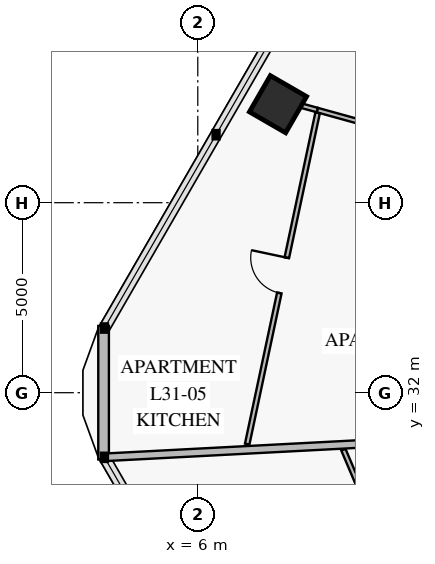
"""IFC4 building model, lengths in metres.
Left out: names, types, materials, properties, quantities, classifications, styles, units other than length and angle.
Written with IfcOpenShell. Run it as: python <this file> out.ifc"""

import sys

from ifc_helpers import new_model, si_unit, direction, frame, frame_2d, origin, origin_2d, place, context, subcontext, project, spatial, rectangle, extrude, element, fill, save


model = new_model("IFC4")
c1 = context("Model", 3, precision=1e-05, world=origin(), true_north=direction((0.0, 1.0)))
c2 = subcontext(c1, "Body", "Model", "MODEL_VIEW")
j1 = project(units=[si_unit("LENGTHUNIT", "METRE"), si_unit("PLANEANGLEUNIT", "RADIAN")], contexts=[c1])
p1 = place(None, origin())
s1 = spatial("IfcSite", under=j1, at=p1, CompositionType="ELEMENT")
p2 = place(p1, origin())
s2 = spatial("IfcBuilding", under=s1, at=p2, CompositionType="ELEMENT")
p3 = place(p2, frame((0.0, 0.0, 126.6)))
s3 = spatial("IfcBuildingStorey", under=s2, at=p3, CompositionType="ELEMENT", Elevation=126.6)
p4 = place(p3, frame((8.111, 39.592, 0.0), z_axis=(0.0, 0.0, 1.0), x_axis=(-0.5, -0.866025403784, 0.0)))
e1 = element("IfcColumn", 1, at=p4, inside=s3, PredefinedType="COLUMN", context=c2, shape_type="SweptSolid", body=[
    extrude(rectangle(XDim=1.1, YDim=1.1, at=origin_2d()), origin(), (0.0, 0.0, 1.0), 3.55),
])
p5 = place(p3, frame((3.521, 30.242, 0.0), z_axis=(0.0, 0.0, 1.0), x_axis=(0.0, 1.0, 0.0)))
e2 = element("IfcWall", 2, at=p5, inside=s3, PredefinedType="SOLIDWALL", context=c2, shape_type="SweptSolid", body=[
    extrude(rectangle(XDim=3.515, YDim=0.28, at=frame_2d((1.758, 0.0))), origin(), (0.0, 0.0, 1.0), 3.55),
])
p6 = place(p3, frame((12.165, 38.601, 0.0), z_axis=(0.0, 0.0, 1.0), x_axis=(-0.963725092481, 0.266896882939, 0.0)))
e3 = element("IfcWall", 3, at=p6, inside=s3, PredefinedType="PARTITIONING", context=c2, shape_type="SweptSolid", body=[
    extrude(rectangle(XDim=3.136, YDim=0.12, at=frame_2d((1.568, 0.0))), origin(), (0.0, 0.0, 1.0), 2.85),
])
p7 = place(p3, frame((9.153, 39.365, 0.0), z_axis=(0.0, 0.0, 1.0), x_axis=(-0.207912484837, -0.978147431959, 0.0)))
e4 = element("IfcWall", 4, at=p7, inside=s3, PredefinedType="PARTITIONING", context=c2, shape_type="SweptSolid", body=[
    extrude(rectangle(XDim=8.913, YDim=0.12, at=frame_2d((4.456, 0.0))), origin(), (0.0, 0.0, 1.0), 2.8),
])
p8 = place(p7, frame((3.897, 0.0, 0.0)))
e5 = element("IfcOpeningElement", 5, at=p8, cuts=e4, PredefinedType="OPENING", context=c2, shape_type="SweptSolid", body=[
    extrude(rectangle(XDim=0.95, YDim=2.1, at=frame_2d((0.475, 1.05))), frame((0.0, 0.072, 0.0), z_axis=(0.0, -1.0, 0.0), x_axis=(1.0, 0.0, 0.0)), (0.0, 0.0, 1.0), 0.144),
])
p9 = place(p3, frame((9.832, 30.5, 0.0), z_axis=(0.0, 0.0, 1.0), x_axis=(0.390720983602, -0.920509159636, 0.0)))
e6 = element("IfcWall", 6, at=p9, inside=s3, PredefinedType="PARTITIONING", context=c2, shape_type="SweptSolid", body=[
    extrude(rectangle(XDim=6.924, YDim=0.12, at=frame_2d((3.462, 0.0))), origin(), (0.0, 0.0, 1.0), 2.85),
])
p10 = place(p9, frame((1.424, 0.0, 0.0)))
e7 = element("IfcOpeningElement", 7, at=p10, cuts=e6, PredefinedType="OPENING", context=c2, shape_type="SweptSolid", body=[
    extrude(rectangle(XDim=0.95, YDim=2.1, at=frame_2d((0.475, 1.05))), frame((0.0, 0.072, 0.0), z_axis=(0.0, -1.0, 0.0), x_axis=(1.0, 0.0, 0.0)), (0.0, 0.0, 1.0), 0.144),
])
p11 = place(p9, frame((4.644, 0.0, 0.0)))
e8 = element("IfcOpeningElement", 8, at=p11, cuts=e6, PredefinedType="OPENING", context=c2, shape_type="SweptSolid", body=[
    extrude(rectangle(XDim=0.95, YDim=2.1, at=frame_2d((0.475, 1.05))), frame((0.0, 0.072, 0.0), z_axis=(0.0, -1.0, 0.0), x_axis=(1.0, 0.0, 0.0)), (0.0, 0.0, 1.0), 0.144),
])
p12 = place(p3, frame((22.96, 38.644, 0.0), z_axis=(0.0, 0.0, 1.0), x_axis=(-0.891012124705, 0.453979507939, 0.0)))
e9 = element("IfcWall", 9, at=p12, inside=s3, PredefinedType="PARTITIONING", context=c2, shape_type="SweptSolid", body=[
    extrude(rectangle(XDim=14.363, YDim=0.2, at=frame_2d((7.182, 0.0))), origin(), (0.0, 0.0, 1.0), 2.8),
])
p13 = place(p3, frame((9.143, 39.438, 0.0), z_axis=(0.0, 0.0, 1.0), x_axis=(-0.963794427179, 0.266646399072, 0.0)))
e10 = element("IfcWall", 10, at=p13, inside=s3, PredefinedType="PARTITIONING", context=c2, shape_type="SweptSolid", body=[
    extrude(rectangle(XDim=0.48, YDim=0.12, at=frame_2d((0.24, 0.0))), origin(), (0.0, 0.0, 1.0), 2.85),
])
p14 = place(p3, frame((22.96, 31.317, 0.0), z_axis=(0.0, 0.0, 1.0), x_axis=(-0.998629494248, -0.052336729143, 0.0)))
e11 = element("IfcWall", 11, at=p14, inside=s3, PredefinedType="PARTITIONING", context=c2, shape_type="SweptSolid", body=[
    extrude(rectangle(XDim=19.443, YDim=0.2, at=frame_2d((9.721, 0.0))), origin(), (0.0, 0.0, 1.0), 2.8),
])
p15 = place(p8, frame((0.95, 0.0, 0.0), z_axis=(0.0, 0.0, 1.0), x_axis=(-1.0, 0.0, 0.0)))
e12 = element("IfcDoor", 12, at=p15, inside=s3, OperationType="SINGLE_SWING_RIGHT", PredefinedType="DOOR", context=c2, shape_type="SweptSolid", body=[
    extrude(rectangle(XDim=0.95, YDim=2.1, at=frame_2d((0.475, 1.05))), frame((0.0, 0.025, 0.0), z_axis=(0.0, -1.0, 0.0), x_axis=(1.0, 0.0, 0.0)), (0.0, 0.0, 1.0), 0.05),
])
fill(e5, e12)
save(model, sys.argv[1])
